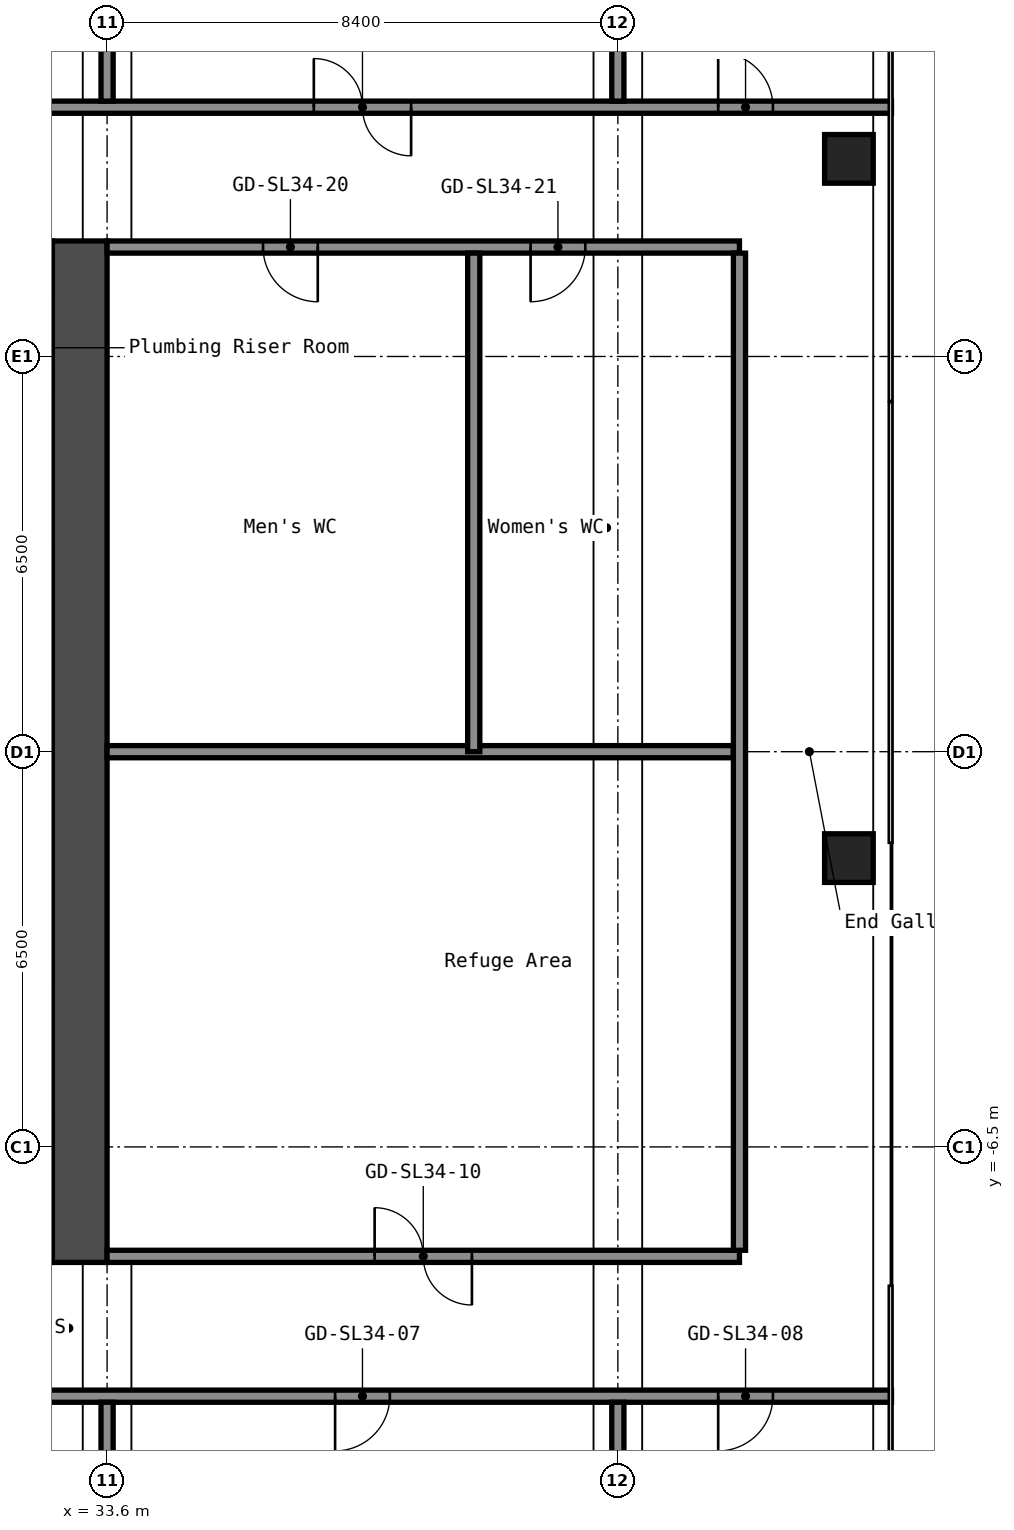
"""IFC4 building model, lengths in metres.
Left out: names, types, materials, properties, quantities, classifications, styles, units other than length and angle.
Written with IfcOpenShell. Run it as: python <this file> out.ifc"""

import sys

from ifc_helpers import new_model, si_unit, direction, frame, frame_2d, origin, origin_2d, place, context, subcontext, project, spatial, rectangle, hollow_rectangle, extrude, element, fill, save


model = new_model("IFC4")
c1 = context("Model", 3, precision=1e-05, world=origin(), true_north=direction((0.0, 1.0)))
c2 = subcontext(c1, "Body", "Model", "MODEL_VIEW")
j1 = project(units=[si_unit("LENGTHUNIT", "METRE"), si_unit("PLANEANGLEUNIT", "RADIAN")], contexts=[c1])
p1 = place(None, origin())
s1 = spatial("IfcSite", under=j1, at=p1, CompositionType="ELEMENT")
p2 = place(p1, origin())
s2 = spatial("IfcBuilding", under=s1, at=p2, CompositionType="ELEMENT")
p3 = place(p2, frame((0.0, 0.0, 120.2)))
s3 = spatial("IfcBuildingStorey", under=s2, at=p3, CompositionType="ELEMENT", Elevation=120.2)
for number, where, z_axis, x_axis in (
    (1, (45.8, -1.75, 0.0), (0.0, 0.0, 1.0), (1.0, 0.0, 0.0)),
    (2, (45.8, 9.75, 0.0), (0.0, 0.0, 1.0), (1.0, 0.0, 0.0)),
):
    element("IfcColumn", number, at=place(p3, frame(where, z_axis=z_axis, x_axis=x_axis)), inside=s3, PredefinedType="COLUMN", context=c2, shape_type="SweptSolid", body=[
        extrude(hollow_rectangle(XDim=0.8, YDim=0.8, WallThickness=0.032, at=origin_2d()), origin(), (0.0, 0.0, 1.0), 4.1),
    ])
p4 = place(p3, frame((33.15, -8.4, 0.0), z_axis=(0.0, 0.0, 1.0), x_axis=(0.0, 1.0, 0.0)))
e3 = element("IfcWall", 3, at=p4, inside=s3, PredefinedType="SHEAR", context=c2, shape_type="SweptSolid", body=[
    extrude(rectangle(XDim=16.8, YDim=0.9, at=frame_2d((8.4, 0.0))), origin(), (0.0, 0.0, 1.0), 4.1),
])
p5 = place(p3, frame((16.8, -10.6, 0.0), z_axis=(0.0, 0.0, 1.0), x_axis=(1.0, 0.0, 0.0)))
e4 = element("IfcWall", 4, at=p5, inside=s3, PredefinedType="PARTITIONING", context=c2, shape_type="SweptSolid", body=[
    extrude(rectangle(XDim=29.7, YDim=0.2, at=frame_2d((14.85, 0.0))), origin(), (0.0, 0.0, 1.0), 4.1),
])
p6 = place(p5, frame((3.4, 0.0, 0.0)))
e5 = element("IfcOpeningElement", 5, at=p6, cuts=e4, PredefinedType="OPENING", context=c2, shape_type="SweptSolid", body=[
    extrude(rectangle(XDim=1.6, YDim=2.1, at=frame_2d((0.8, 1.05))), frame((0.0, 0.11, 0.0), z_axis=(0.0, -1.0, 0.0), x_axis=(1.0, 0.0, 0.0)), (0.0, 0.0, 1.0), 0.22),
])
p7 = place(p5, frame((12.15, 0.0, 0.0)))
e6 = element("IfcOpeningElement", 6, at=p7, cuts=e4, PredefinedType="OPENING", context=c2, shape_type="SweptSolid", body=[
    extrude(rectangle(XDim=0.9, YDim=2.1, at=frame_2d((0.45, 1.05))), frame((0.0, 0.11, 0.0), z_axis=(0.0, -1.0, 0.0), x_axis=(1.0, 0.0, 0.0)), (0.0, 0.0, 1.0), 0.22),
])
p8 = place(p5, frame((20.55, 0.0, 0.0)))
e7 = element("IfcOpeningElement", 7, at=p8, cuts=e4, PredefinedType="OPENING", context=c2, shape_type="SweptSolid", body=[
    extrude(rectangle(XDim=0.9, YDim=2.1, at=frame_2d((0.45, 1.05))), frame((0.0, 0.11, 0.0), z_axis=(0.0, -1.0, 0.0), x_axis=(1.0, 0.0, 0.0)), (0.0, 0.0, 1.0), 0.22),
])
p9 = place(p5, frame((26.85, 0.0, 0.0)))
e8 = element("IfcOpeningElement", 8, at=p9, cuts=e4, PredefinedType="OPENING", context=c2, shape_type="SweptSolid", body=[
    extrude(rectangle(XDim=0.9, YDim=2.1, at=frame_2d((0.45, 1.05))), frame((0.0, 0.11, 0.0), z_axis=(0.0, -1.0, 0.0), x_axis=(1.0, 0.0, 0.0)), (0.0, 0.0, 1.0), 0.22),
])
p10 = place(p3, frame((33.6, -8.3, 0.0), z_axis=(0.0, 0.0, 1.0), x_axis=(1.0, 0.0, 0.0)))
e9 = element("IfcWall", 9, at=p10, inside=s3, PredefinedType="PARTITIONING", context=c2, shape_type="SweptSolid", body=[
    extrude(rectangle(XDim=10.4, YDim=0.2, at=frame_2d((5.2, 0.0))), origin(), (0.0, 0.0, 1.0), 4.1),
])
p11 = place(p10, frame((4.4, 0.0, 0.0)))
e10 = element("IfcOpeningElement", 10, at=p11, cuts=e9, PredefinedType="OPENING", context=c2, shape_type="SweptSolid", body=[
    extrude(rectangle(XDim=1.6, YDim=2.1, at=frame_2d((0.8, 1.05))), frame((0.0, 0.11, 0.0), z_axis=(0.0, -1.0, 0.0), x_axis=(1.0, 0.0, 0.0)), (0.0, 0.0, 1.0), 0.22),
])
p12 = place(p3, frame((33.6, 0.0, 0.0), z_axis=(0.0, 0.0, 1.0), x_axis=(1.0, 0.0, 0.0)))
e11 = element("IfcWall", 11, at=p12, inside=s3, PredefinedType="PARTITIONING", context=c2, shape_type="SweptSolid", body=[
    extrude(rectangle(XDim=10.3, YDim=0.2, at=frame_2d((5.15, 0.0))), origin(), (0.0, 0.0, 1.0), 4.1),
])
p13 = place(p3, frame((33.6, 8.3, 0.0), z_axis=(0.0, 0.0, 1.0), x_axis=(1.0, 0.0, 0.0)))
e12 = element("IfcWall", 12, at=p13, inside=s3, PredefinedType="PARTITIONING", context=c2, shape_type="SweptSolid", body=[
    extrude(rectangle(XDim=10.4, YDim=0.2, at=frame_2d((5.2, 0.0))), origin(), (0.0, 0.0, 1.0), 4.1),
])
p14 = place(p13, frame((2.565, 0.0, 0.0)))
e13 = element("IfcOpeningElement", 13, at=p14, cuts=e12, PredefinedType="OPENING", context=c2, shape_type="SweptSolid", body=[
    extrude(rectangle(XDim=0.9, YDim=2.1, at=frame_2d((0.45, 1.05))), frame((0.0, 0.11, 0.0), z_axis=(0.0, -1.0, 0.0), x_axis=(1.0, 0.0, 0.0)), (0.0, 0.0, 1.0), 0.22),
])
p15 = place(p13, frame((6.965, 0.0, 0.0)))
e14 = element("IfcOpeningElement", 14, at=p15, cuts=e12, PredefinedType="OPENING", context=c2, shape_type="SweptSolid", body=[
    extrude(rectangle(XDim=0.9, YDim=2.1, at=frame_2d((0.45, 1.05))), frame((0.0, 0.11, 0.0), z_axis=(0.0, -1.0, 0.0), x_axis=(1.0, 0.0, 0.0)), (0.0, 0.0, 1.0), 0.22),
])
p16 = place(p3, frame((16.8, 10.6, 0.0), z_axis=(0.0, 0.0, 1.0), x_axis=(1.0, 0.0, 0.0)))
e15 = element("IfcWall", 15, at=p16, inside=s3, PredefinedType="PARTITIONING", context=c2, shape_type="SweptSolid", body=[
    extrude(rectangle(XDim=29.7, YDim=0.2, at=frame_2d((14.85, 0.0))), origin(), (0.0, 0.0, 1.0), 4.1),
])
p17 = place(p16, frame((3.75, 0.0, 0.0)))
e16 = element("IfcOpeningElement", 16, at=p17, cuts=e15, PredefinedType="OPENING", context=c2, shape_type="SweptSolid", body=[
    extrude(rectangle(XDim=0.9, YDim=2.1, at=frame_2d((0.45, 1.05))), frame((0.0, 0.11, 0.0), z_axis=(0.0, -1.0, 0.0), x_axis=(1.0, 0.0, 0.0)), (0.0, 0.0, 1.0), 0.22),
])
p18 = place(p16, frame((11.8, 0.0, 0.0)))
e17 = element("IfcOpeningElement", 17, at=p18, cuts=e15, PredefinedType="OPENING", context=c2, shape_type="SweptSolid", body=[
    extrude(rectangle(XDim=1.6, YDim=2.1, at=frame_2d((0.8, 1.05))), frame((0.0, 0.11, 0.0), z_axis=(0.0, -1.0, 0.0), x_axis=(1.0, 0.0, 0.0)), (0.0, 0.0, 1.0), 0.22),
])
p19 = place(p16, frame((20.2, 0.0, 0.0)))
e18 = element("IfcOpeningElement", 18, at=p19, cuts=e15, PredefinedType="OPENING", context=c2, shape_type="SweptSolid", body=[
    extrude(rectangle(XDim=1.6, YDim=2.1, at=frame_2d((0.8, 1.05))), frame((0.0, 0.11, 0.0), z_axis=(0.0, -1.0, 0.0), x_axis=(1.0, 0.0, 0.0)), (0.0, 0.0, 1.0), 0.22),
])
p20 = place(p16, frame((26.85, 0.0, 0.0)))
e19 = element("IfcOpeningElement", 19, at=p20, cuts=e15, PredefinedType="OPENING", context=c2, shape_type="SweptSolid", body=[
    extrude(rectangle(XDim=0.9, YDim=2.1, at=frame_2d((0.45, 1.05))), frame((0.0, 0.11, 0.0), z_axis=(0.0, -1.0, 0.0), x_axis=(1.0, 0.0, 0.0)), (0.0, 0.0, 1.0), 0.22),
])
p21 = place(p3, frame((33.6, -19.3, 0.0), z_axis=(0.0, 0.0, 1.0), x_axis=(0.0, 1.0, 0.0)))
e20 = element("IfcWall", 20, at=p21, inside=s3, PredefinedType="PARTITIONING", context=c2, shape_type="SweptSolid", body=[
    extrude(rectangle(XDim=8.6, YDim=0.2, at=frame_2d((4.3, 0.0))), origin(), (0.0, 0.0, 1.0), 4.1),
])
p22 = place(p3, frame((33.6, 10.7, 0.0), z_axis=(0.0, 0.0, 1.0), x_axis=(0.0, 1.0, 0.0)))
e21 = element("IfcWall", 21, at=p22, inside=s3, PredefinedType="PARTITIONING", context=c2, shape_type="SweptSolid", body=[
    extrude(rectangle(XDim=12.85, YDim=0.2, at=frame_2d((6.425, 0.0))), origin(), (0.0, 0.0, 1.0), 4.1),
])
p23 = place(p3, frame((39.63, 0.0, 0.0), z_axis=(0.0, 0.0, 1.0), x_axis=(0.0, 1.0, 0.0)))
e22 = element("IfcWall", 22, at=p23, inside=s3, PredefinedType="PARTITIONING", context=c2, shape_type="SweptSolid", body=[
    extrude(rectangle(XDim=8.2, YDim=0.2, at=frame_2d((4.1, 0.0))), origin(), (0.0, 0.0, 1.0), 4.1),
])
p24 = place(p3, frame((42.0, -19.3, 0.0), z_axis=(0.0, 0.0, 1.0), x_axis=(0.0, 1.0, 0.0)))
e23 = element("IfcWall", 23, at=p24, inside=s3, PredefinedType="PARTITIONING", context=c2, shape_type="SweptSolid", body=[
    extrude(rectangle(XDim=8.6, YDim=0.2, at=frame_2d((4.3, 0.0))), origin(), (0.0, 0.0, 1.0), 4.1),
])
p25 = place(p3, frame((42.0, 10.7, 0.0), z_axis=(0.0, 0.0, 1.0), x_axis=(0.0, 1.0, 0.0)))
e24 = element("IfcWall", 24, at=p25, inside=s3, PredefinedType="PARTITIONING", context=c2, shape_type="SweptSolid", body=[
    extrude(rectangle(XDim=12.85, YDim=0.2, at=frame_2d((6.425, 0.0))), origin(), (0.0, 0.0, 1.0), 4.1),
])
p26 = place(p3, frame((44.0, -8.2, 0.0), z_axis=(0.0, 0.0, 1.0), x_axis=(0.0, 1.0, 0.0)))
e25 = element("IfcWall", 25, at=p26, inside=s3, PredefinedType="PARTITIONING", context=c2, shape_type="SweptSolid", body=[
    extrude(rectangle(XDim=16.4, YDim=0.2, at=frame_2d((8.2, 0.0))), origin(), (0.0, 0.0, 1.0), 4.1),
])
p27 = place(p8, origin())
e26 = element("IfcDoor", 26, at=p27, inside=s3, OperationType="SINGLE_SWING_LEFT", PredefinedType="DOOR", context=c2, shape_type="SweptSolid", body=[
    extrude(rectangle(XDim=0.9, YDim=2.1, at=frame_2d((0.45, 1.05))), frame((0.0, 0.025, 0.0), z_axis=(0.0, -1.0, 0.0), x_axis=(1.0, 0.0, 0.0)), (0.0, 0.0, 1.0), 0.05),
])
fill(e7, e26)
p28 = place(p9, origin())
e27 = element("IfcDoor", 27, at=p28, inside=s3, OperationType="SINGLE_SWING_LEFT", PredefinedType="DOOR", context=c2, shape_type="SweptSolid", body=[
    extrude(rectangle(XDim=0.9, YDim=2.1, at=frame_2d((0.45, 1.05))), frame((0.0, 0.025, 0.0), z_axis=(0.0, -1.0, 0.0), x_axis=(1.0, 0.0, 0.0)), (0.0, 0.0, 1.0), 0.05),
])
fill(e8, e27)
p29 = place(p11, origin())
e28 = element("IfcDoor", 28, at=p29, inside=s3, OperationType="DOUBLE_DOOR_SINGLE_SWING", PredefinedType="DOOR", context=c2, shape_type="SweptSolid", body=[
    extrude(rectangle(XDim=1.6, YDim=2.1, at=frame_2d((0.8, 1.05))), frame((0.0, 0.025, 0.0), z_axis=(0.0, -1.0, 0.0), x_axis=(1.0, 0.0, 0.0)), (0.0, 0.0, 1.0), 0.05),
])
fill(e10, e28)
p30 = place(p14, origin())
e29 = element("IfcDoor", 29, at=p30, inside=s3, OperationType="SINGLE_SWING_RIGHT", PredefinedType="DOOR", context=c2, shape_type="SweptSolid", body=[
    extrude(rectangle(XDim=0.9, YDim=2.1, at=frame_2d((0.45, 1.05))), frame((0.0, 0.025, 0.0), z_axis=(0.0, -1.0, 0.0), x_axis=(1.0, 0.0, 0.0)), (0.0, 0.0, 1.0), 0.05),
])
fill(e13, e29)
p31 = place(p15, origin())
e30 = element("IfcDoor", 30, at=p31, inside=s3, OperationType="SINGLE_SWING_LEFT", PredefinedType="DOOR", context=c2, shape_type="SweptSolid", body=[
    extrude(rectangle(XDim=0.9, YDim=2.1, at=frame_2d((0.45, 1.05))), frame((0.0, 0.025, 0.0), z_axis=(0.0, -1.0, 0.0), x_axis=(1.0, 0.0, 0.0)), (0.0, 0.0, 1.0), 0.05),
])
fill(e14, e30)
p32 = place(p19, origin())
e31 = element("IfcDoor", 31, at=p32, inside=s3, OperationType="DOUBLE_DOOR_SINGLE_SWING", PredefinedType="DOOR", context=c2, shape_type="SweptSolid", body=[
    extrude(rectangle(XDim=1.6, YDim=2.1, at=frame_2d((0.8, 1.05))), frame((0.0, 0.025, 0.0), z_axis=(0.0, -1.0, 0.0), x_axis=(1.0, 0.0, 0.0)), (0.0, 0.0, 1.0), 0.05),
])
fill(e18, e31)
p33 = place(p20, origin())
e32 = element("IfcDoor", 32, at=p33, inside=s3, OperationType="SINGLE_SWING_RIGHT", PredefinedType="DOOR", context=c2, shape_type="SweptSolid", body=[
    extrude(rectangle(XDim=0.9, YDim=2.1, at=frame_2d((0.45, 1.05))), frame((0.0, 0.025, 0.0), z_axis=(0.0, -1.0, 0.0), x_axis=(1.0, 0.0, 0.0)), (0.0, 0.0, 1.0), 0.05),
])
fill(e19, e32)
save(model, sys.argv[1])
